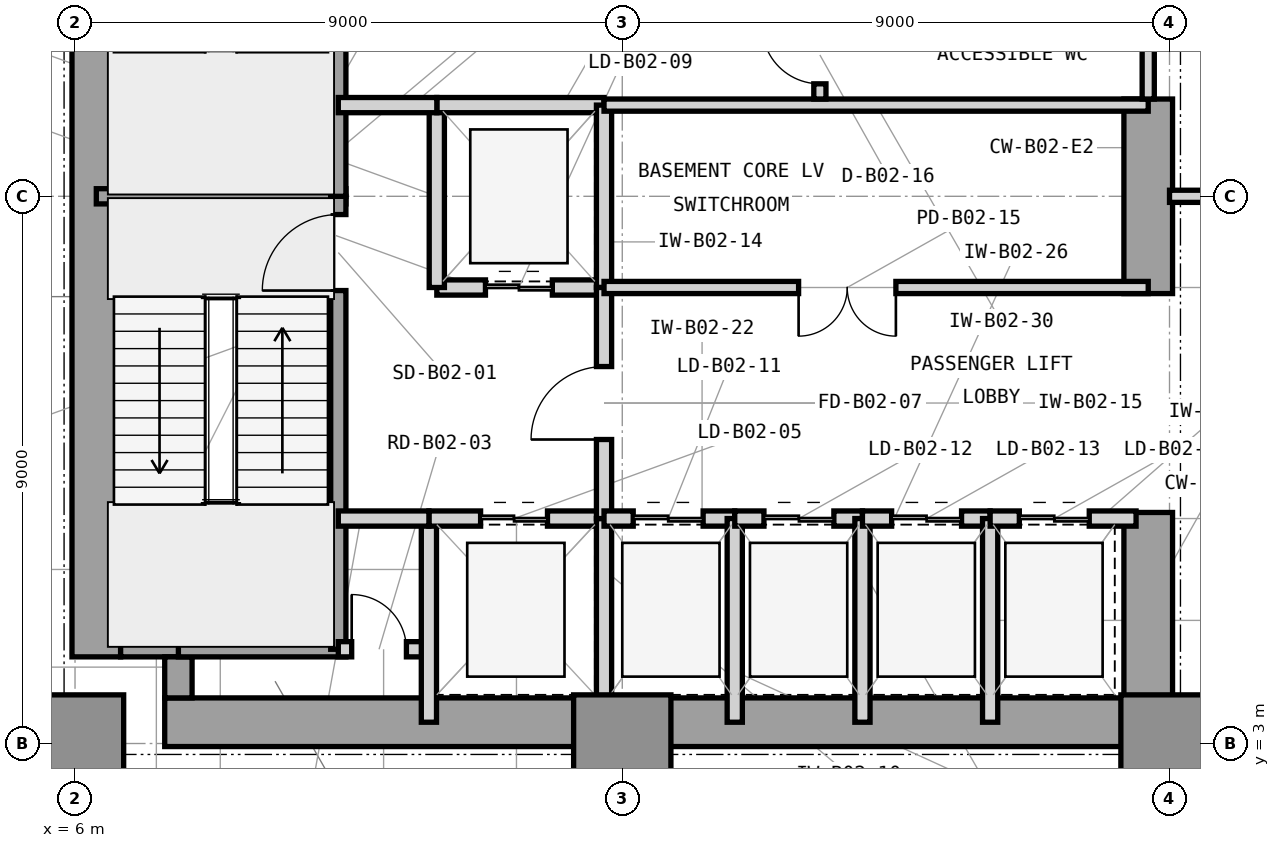
"""IFC4 building model, lengths in metres.
Left out: names, types, materials, properties, quantities, classifications, styles, units other than length and angle.
Written with IfcOpenShell. Run it as: python <this file> out.ifc"""

import sys

from ifc_helpers import new_model, si_unit, direction, frame, frame_2d, origin, origin_2d, place, context, subcontext, project, spatial, rectangle, extrude, element, fill, save


model = new_model("IFC4")
c1 = context("Model", 3, precision=1e-05, world=origin(), true_north=direction((0.0, 1.0)))
c2 = subcontext(c1, "Body", "Model", "MODEL_VIEW")
j1 = project(units=[si_unit("LENGTHUNIT", "METRE"), si_unit("PLANEANGLEUNIT", "RADIAN")], contexts=[c1])
p1 = place(None, origin())
s1 = spatial("IfcSite", under=j1, at=p1, CompositionType="ELEMENT")
p2 = place(p1, origin())
s2 = spatial("IfcBuilding", under=s1, at=p2, CompositionType="ELEMENT")
p3 = place(p2, frame((0.0, 0.0, -9.0)))
s3 = spatial("IfcBuildingStorey", under=s2, at=p3, CompositionType="ELEMENT", Elevation=-9.0)
p4 = place(p3, frame((7.475, 3.35, 0.0), z_axis=(0.0, 0.0, 1.0), x_axis=(1.0, 0.0, 0.0)))
e1 = element("IfcWall", 1, at=p4, inside=s3, PredefinedType="SHEAR", context=c2, shape_type="SweptSolid", body=[
    extrude(rectangle(XDim=16.575, YDim=0.8, at=frame_2d((8.288, 0.0))), origin(), (0.0, 0.0, 1.0), 4.5),
])
p5 = place(p3, frame((6.35, 4.425, 0.0), z_axis=(0.0, 0.0, 1.0), x_axis=(0.0, 1.0, 0.0)))
e2 = element("IfcWall", 2, at=p5, inside=s3, PredefinedType="SHEAR", context=c2, shape_type="SweptSolid", body=[
    extrude(rectangle(XDim=15.15, YDim=0.8, at=frame_2d((7.575, 0.0))), origin(), (0.0, 0.0, 1.0), 4.5),
])
p6 = place(p3, frame((23.65, 3.75, 0.0), z_axis=(0.0, 0.0, 1.0), x_axis=(0.0, 1.0, 0.0)))
e3 = element("IfcWall", 3, at=p6, inside=s3, PredefinedType="SHEAR", context=c2, shape_type="SweptSolid", body=[
    extrude(rectangle(XDim=3.05, YDim=0.8, at=frame_2d((1.525, 0.0))), origin(), (0.0, 0.0, 1.0), 4.5),
])
p7 = place(p3, frame((23.65, 10.4, 0.0), z_axis=(0.0, 0.0, 1.0), x_axis=(0.0, 1.0, 0.0)))
e4 = element("IfcWall", 4, at=p7, inside=s3, PredefinedType="SHEAR", context=c2, shape_type="SweptSolid", body=[
    extrude(rectangle(XDim=3.2, YDim=0.8, at=frame_2d((1.6, 0.0))), origin(), (0.0, 0.0, 1.0), 4.5),
])
p8 = place(p3, frame((6.75, 4.65, 0.0), z_axis=(0.0, 0.0, 1.0), x_axis=(1.0, 0.0, 0.0)))
e5 = element("IfcWall", 5, at=p8, inside=s3, PredefinedType="SHEAR", context=c2, shape_type="SweptSolid", body=[
    extrude(rectangle(XDim=1.175, YDim=0.45, at=frame_2d((0.587, 0.0))), origin(), (0.0, 0.0, 1.0), 4.5),
])
p9 = place(p3, frame((7.7, 3.75, 0.0), z_axis=(0.0, 0.0, 1.0), x_axis=(0.0, 1.0, 0.0)))
e6 = element("IfcWall", 6, at=p9, inside=s3, PredefinedType="SHEAR", context=c2, shape_type="SweptSolid", body=[
    extrude(rectangle(XDim=0.675, YDim=0.45, at=frame_2d((0.337, 0.0))), origin(), (0.0, 0.0, 1.0), 4.5),
])
for number, where, z_axis, x_axis in (
    (7, (6.0, 3.0, 0.0), (0.0, 0.0, 1.0), (1.0, 0.0, 0.0)),
    (8, (15.0, 3.0, 0.0), (0.0, 0.0, 1.0), (1.0, 0.0, 0.0)),
    (9, (24.0, 3.0, 0.0), (0.0, 0.0, 1.0), (1.0, 0.0, 0.0)),
):
    element("IfcColumn", number, at=place(p3, frame(where, z_axis=z_axis, x_axis=x_axis)), inside=s3, PredefinedType="COLUMN", context=c2, shape_type="SweptSolid", body=[
        extrude(rectangle(XDim=1.6, YDim=1.6, at=origin_2d()), origin(), (0.0, 0.0, 1.0), 4.5),
    ])
p10 = place(p3, frame((6.35, 12.0, 0.0), z_axis=(0.0, 0.0, 1.0), x_axis=(1.0, 0.0, 0.0)))
e10 = element("IfcWall", 10, at=p10, inside=s3, PredefinedType="SHEAR", context=c2, shape_type="SweptSolid", body=[
    extrude(rectangle(XDim=4.105, YDim=0.25, at=frame_2d((2.052, 0.0))), origin(), (0.0, 0.0, 1.0), 4.5),
])
p11 = place(p3, frame((7.7, 4.55, 0.0), z_axis=(0.0, 0.0, 1.0), x_axis=(1.0, 0.0, 0.0)))
e11 = element("IfcWall", 11, at=p11, inside=s3, PredefinedType="SHEAR", context=c2, shape_type="SweptSolid", body=[
    extrude(rectangle(XDim=2.755, YDim=0.25, at=frame_2d((1.377, 0.0))), origin(), (0.0, 0.0, 1.0), 4.5),
])
p12 = place(p3, frame((10.33, 4.55, 0.0), z_axis=(0.0, 0.0, 1.0), x_axis=(0.0, 1.0, 0.0)))
e12 = element("IfcWall", 12, at=p12, inside=s3, PredefinedType="SHEAR", context=c2, shape_type="SweptSolid", body=[
    extrude(rectangle(XDim=7.45, YDim=0.25, at=frame_2d((3.725, 0.0))), origin(), (0.0, 0.0, 1.0), 4.5),
])
p13 = place(p12, frame((5.9, 0.0, 0.0)))
e13 = element("IfcOpeningElement", 13, at=p13, cuts=e12, PredefinedType="OPENING", context=c2, shape_type="SweptSolid", body=[
    extrude(rectangle(XDim=1.25, YDim=2.2, at=frame_2d((0.625, 1.1))), frame((0.0, 0.135, 0.0), z_axis=(0.0, -1.0, 0.0), x_axis=(1.0, 0.0, 0.0)), (0.0, 0.0, 1.0), 0.27),
])
p14 = place(p3, frame((10.33, 12.0, 0.0), z_axis=(0.0, 0.0, 1.0), x_axis=(0.0, 1.0, 0.0)))
e14 = element("IfcWall", 14, at=p14, inside=s3, PredefinedType="SHEAR", context=c2, shape_type="SweptSolid", body=[
    extrude(rectangle(XDim=7.45, YDim=0.25, at=frame_2d((3.725, 0.0))), origin(), (0.0, 0.0, 1.0), 4.5),
])
p15 = place(p14, frame((5.85, 0.0, 0.0)))
e15 = element("IfcOpeningElement", 15, at=p15, cuts=e14, PredefinedType="OPENING", context=c2, shape_type="SweptSolid", body=[
    extrude(rectangle(XDim=1.25, YDim=2.2, at=frame_2d((0.625, 1.1))), frame((0.0, 0.135, 0.0), z_axis=(0.0, -1.0, 0.0), x_axis=(1.0, 0.0, 0.0)), (0.0, 0.0, 1.0), 0.27),
])
p16 = place(p3, frame((10.33, 4.55, 0.0), z_axis=(0.0, 0.0, 1.0), x_axis=(1.0, 0.0, 0.0)))
e16 = element("IfcWall", 16, at=p16, inside=s3, PredefinedType="PARTITIONING", context=c2, shape_type="SweptSolid", body=[
    extrude(rectangle(XDim=1.49, YDim=0.25, at=frame_2d((0.745, 0.0))), origin(), (0.0, 0.0, 1.0), 4.14),
])
p17 = place(p16, frame((0.22, 0.0, 0.0)))
e17 = element("IfcOpeningElement", 17, at=p17, cuts=e16, PredefinedType="OPENING", context=c2, shape_type="SweptSolid", body=[
    extrude(rectangle(XDim=0.9, YDim=2.1, at=frame_2d((0.45, 1.05))), frame((0.0, 0.135, 0.0), z_axis=(0.0, -1.0, 0.0), x_axis=(1.0, 0.0, 0.0)), (0.0, 0.0, 1.0), 0.27),
])
p18 = place(p3, frame((11.82, 3.35, 0.0), z_axis=(0.0, 0.0, 1.0), x_axis=(0.0, 1.0, 0.0)))
e18 = element("IfcWall", 18, at=p18, inside=s3, PredefinedType="PARTITIONING", context=c2, shape_type="SweptSolid", body=[
    extrude(rectangle(XDim=3.35, YDim=0.25, at=frame_2d((1.675, 0.0))), origin(), (0.0, 0.0, 1.0), 4.14),
])
p19 = place(p3, frame((11.82, 6.7, 0.0), z_axis=(0.0, 0.0, 1.0), x_axis=(1.0, 0.0, 0.0)))
e19 = element("IfcWall", 19, at=p19, inside=s3, PredefinedType="PARTITIONING", context=c2, shape_type="SweptSolid", body=[
    extrude(rectangle(XDim=2.88, YDim=0.25, at=frame_2d((1.44, 0.0))), origin(), (0.0, 0.0, 1.0), 3.523),
])
p20 = place(p19, frame((0.85, 0.0, 0.0)))
e20 = element("IfcOpeningElement", 20, at=p20, cuts=e19, PredefinedType="OPENING", context=c2, shape_type="SweptSolid", body=[
    extrude(rectangle(XDim=1.1, YDim=2.25, at=frame_2d((0.55, 1.125))), frame((0.0, 0.135, 0.0), z_axis=(0.0, -1.0, 0.0), x_axis=(1.0, 0.0, 0.0)), (0.0, 0.0, 1.0), 0.27),
])
p21 = place(p3, frame((14.7, 3.35, 0.0), z_axis=(0.0, 0.0, 1.0), x_axis=(0.0, 1.0, 0.0)))
e21 = element("IfcWall", 21, at=p21, inside=s3, PredefinedType="PARTITIONING", context=c2, shape_type="SweptSolid", body=[
    extrude(rectangle(XDim=3.35, YDim=0.25, at=frame_2d((1.675, 0.0))), origin(), (0.0, 0.0, 1.0), 4.14),
])
p22 = place(p3, frame((11.95, 10.5, 0.0), z_axis=(0.0, 0.0, 1.0), x_axis=(1.0, 0.0, 0.0)))
e22 = element("IfcWall", 22, at=p22, inside=s3, PredefinedType="PARTITIONING", context=c2, shape_type="SweptSolid", body=[
    extrude(rectangle(XDim=2.75, YDim=0.25, at=frame_2d((1.375, 0.0))), origin(), (0.0, 0.0, 1.0), 3.523),
])
p23 = place(p22, frame((0.8, 0.0, 0.0)))
e23 = element("IfcOpeningElement", 23, at=p23, cuts=e22, PredefinedType="OPENING", context=c2, shape_type="SweptSolid", body=[
    extrude(rectangle(XDim=1.1, YDim=2.25, at=frame_2d((0.55, 1.125))), frame((0.0, 0.135, 0.0), z_axis=(0.0, -1.0, 0.0), x_axis=(1.0, 0.0, 0.0)), (0.0, 0.0, 1.0), 0.27),
])
p24 = place(p3, frame((11.95, 10.5, 0.0), z_axis=(0.0, 0.0, 1.0), x_axis=(0.0, 1.0, 0.0)))
e24 = element("IfcWall", 24, at=p24, inside=s3, PredefinedType="PARTITIONING", context=c2, shape_type="SweptSolid", body=[
    extrude(rectangle(XDim=3.0, YDim=0.25, at=frame_2d((1.5, 0.0))), origin(), (0.0, 0.0, 1.0), 4.14),
])
p25 = place(p3, frame((11.95, 13.5, 0.0), z_axis=(0.0, 0.0, 1.0), x_axis=(1.0, 0.0, 0.0)))
e25 = element("IfcWall", 25, at=p25, inside=s3, PredefinedType="PARTITIONING", context=c2, shape_type="SweptSolid", body=[
    extrude(rectangle(XDim=2.75, YDim=0.25, at=frame_2d((1.375, 0.0))), origin(), (0.0, 0.0, 1.0), 3.523),
])
p26 = place(p3, frame((14.7, 10.5, 0.0), z_axis=(0.0, 0.0, 1.0), x_axis=(0.0, 1.0, 0.0)))
e26 = element("IfcWall", 26, at=p26, inside=s3, PredefinedType="PARTITIONING", context=c2, shape_type="SweptSolid", body=[
    extrude(rectangle(XDim=3.0, YDim=0.25, at=frame_2d((1.5, 0.0))), origin(), (0.0, 0.0, 1.0), 4.14),
])
p27 = place(p3, frame((14.7, 6.7, 0.0), z_axis=(0.0, 0.0, 1.0), x_axis=(0.0, 1.0, 0.0)))
e27 = element("IfcWall", 27, at=p27, inside=s3, PredefinedType="PARTITIONING", context=c2, shape_type="SweptSolid", body=[
    extrude(rectangle(XDim=3.8, YDim=0.25, at=frame_2d((1.9, 0.0))), origin(), (0.0, 0.0, 1.0), 4.14),
])
p28 = place(p27, frame((1.3, 0.0, 0.0)))
e28 = element("IfcOpeningElement", 28, at=p28, cuts=e27, PredefinedType="OPENING", context=c2, shape_type="SweptSolid", body=[
    extrude(rectangle(XDim=1.2, YDim=2.2, at=frame_2d((0.6, 1.1))), frame((0.0, 0.135, 0.0), z_axis=(0.0, -1.0, 0.0), x_axis=(1.0, 0.0, 0.0)), (0.0, 0.0, 1.0), 0.27),
])
p29 = place(p3, frame((10.33, 13.5, 0.0), z_axis=(0.0, 0.0, 1.0), x_axis=(1.0, 0.0, 0.0)))
e29 = element("IfcWall", 29, at=p29, inside=s3, PredefinedType="PARTITIONING", context=c2, shape_type="SweptSolid", body=[
    extrude(rectangle(XDim=1.62, YDim=0.25, at=frame_2d((0.81, 0.0))), origin(), (0.0, 0.0, 1.0), 3.523),
])
p30 = place(p3, frame((10.33, 6.7, 0.0), z_axis=(0.0, 0.0, 1.0), x_axis=(1.0, 0.0, 0.0)))
e30 = element("IfcWall", 30, at=p30, inside=s3, PredefinedType="PARTITIONING", context=c2, shape_type="SweptSolid", body=[
    extrude(rectangle(XDim=1.49, YDim=0.25, at=frame_2d((0.745, 0.0))), origin(), (0.0, 0.0, 1.0), 3.523),
])
p31 = place(p3, frame((14.7, 6.7, 0.0), z_axis=(0.0, 0.0, 1.0), x_axis=(1.0, 0.0, 0.0)))
e31 = element("IfcWall", 31, at=p31, inside=s3, PredefinedType="PARTITIONING", context=c2, shape_type="SweptSolid", body=[
    extrude(rectangle(XDim=2.15, YDim=0.25, at=frame_2d((1.075, 0.0))), origin(), (0.0, 0.0, 1.0), 3.523),
])
p32 = place(p31, frame((0.48, 0.0, 0.0)))
e32 = element("IfcOpeningElement", 32, at=p32, cuts=e31, PredefinedType="OPENING", context=c2, shape_type="SweptSolid", body=[
    extrude(rectangle(XDim=1.15, YDim=2.25, at=frame_2d((0.575, 1.125))), frame((0.0, 0.135, 0.0), z_axis=(0.0, -1.0, 0.0), x_axis=(1.0, 0.0, 0.0)), (0.0, 0.0, 1.0), 0.27),
])
p33 = place(p3, frame((16.85, 3.35, 0.0), z_axis=(0.0, 0.0, 1.0), x_axis=(0.0, 1.0, 0.0)))
e33 = element("IfcWall", 33, at=p33, inside=s3, PredefinedType="PARTITIONING", context=c2, shape_type="SweptSolid", body=[
    extrude(rectangle(XDim=3.35, YDim=0.25, at=frame_2d((1.675, 0.0))), origin(), (0.0, 0.0, 1.0), 4.14),
])
p34 = place(p3, frame((16.85, 6.7, 0.0), z_axis=(0.0, 0.0, 1.0), x_axis=(1.0, 0.0, 0.0)))
e34 = element("IfcWall", 34, at=p34, inside=s3, PredefinedType="PARTITIONING", context=c2, shape_type="SweptSolid", body=[
    extrude(rectangle(XDim=2.1, YDim=0.25, at=frame_2d((1.05, 0.0))), origin(), (0.0, 0.0, 1.0), 3.523),
])
p35 = place(p34, frame((0.48, 0.0, 0.0)))
e35 = element("IfcOpeningElement", 35, at=p35, cuts=e34, PredefinedType="OPENING", context=c2, shape_type="SweptSolid", body=[
    extrude(rectangle(XDim=1.15, YDim=2.25, at=frame_2d((0.575, 1.125))), frame((0.0, 0.135, 0.0), z_axis=(0.0, -1.0, 0.0), x_axis=(1.0, 0.0, 0.0)), (0.0, 0.0, 1.0), 0.27),
])
p36 = place(p3, frame((18.95, 3.35, 0.0), z_axis=(0.0, 0.0, 1.0), x_axis=(0.0, 1.0, 0.0)))
e36 = element("IfcWall", 36, at=p36, inside=s3, PredefinedType="PARTITIONING", context=c2, shape_type="SweptSolid", body=[
    extrude(rectangle(XDim=3.35, YDim=0.25, at=frame_2d((1.675, 0.0))), origin(), (0.0, 0.0, 1.0), 4.14),
])
p37 = place(p3, frame((18.95, 6.7, 0.0), z_axis=(0.0, 0.0, 1.0), x_axis=(1.0, 0.0, 0.0)))
e37 = element("IfcWall", 37, at=p37, inside=s3, PredefinedType="PARTITIONING", context=c2, shape_type="SweptSolid", body=[
    extrude(rectangle(XDim=2.1, YDim=0.25, at=frame_2d((1.05, 0.0))), origin(), (0.0, 0.0, 1.0), 3.523),
])
p38 = place(p37, frame((0.48, 0.0, 0.0)))
e38 = element("IfcOpeningElement", 38, at=p38, cuts=e37, PredefinedType="OPENING", context=c2, shape_type="SweptSolid", body=[
    extrude(rectangle(XDim=1.15, YDim=2.25, at=frame_2d((0.575, 1.125))), frame((0.0, 0.135, 0.0), z_axis=(0.0, -1.0, 0.0), x_axis=(1.0, 0.0, 0.0)), (0.0, 0.0, 1.0), 0.27),
])
p39 = place(p3, frame((21.05, 3.35, 0.0), z_axis=(0.0, 0.0, 1.0), x_axis=(0.0, 1.0, 0.0)))
e39 = element("IfcWall", 39, at=p39, inside=s3, PredefinedType="PARTITIONING", context=c2, shape_type="SweptSolid", body=[
    extrude(rectangle(XDim=3.35, YDim=0.25, at=frame_2d((1.675, 0.0))), origin(), (0.0, 0.0, 1.0), 4.14),
])
p40 = place(p3, frame((21.05, 6.7, 0.0), z_axis=(0.0, 0.0, 1.0), x_axis=(1.0, 0.0, 0.0)))
e40 = element("IfcWall", 40, at=p40, inside=s3, PredefinedType="PARTITIONING", context=c2, shape_type="SweptSolid", body=[
    extrude(rectangle(XDim=2.4, YDim=0.25, at=frame_2d((1.2, 0.0))), origin(), (0.0, 0.0, 1.0), 3.523),
])
p41 = place(p40, frame((0.48, 0.0, 0.0)))
e41 = element("IfcOpeningElement", 41, at=p41, cuts=e40, PredefinedType="OPENING", context=c2, shape_type="SweptSolid", body=[
    extrude(rectangle(XDim=1.15, YDim=2.25, at=frame_2d((0.575, 1.125))), frame((0.0, 0.135, 0.0), z_axis=(0.0, -1.0, 0.0), x_axis=(1.0, 0.0, 0.0)), (0.0, 0.0, 1.0), 0.27),
])
p42 = place(p3, frame((14.7, 10.5, 0.0), z_axis=(0.0, 0.0, 1.0), x_axis=(1.0, 0.0, 0.0)))
e42 = element("IfcWall", 42, at=p42, inside=s3, PredefinedType="PARTITIONING", context=c2, shape_type="SweptSolid", body=[
    extrude(rectangle(XDim=8.95, YDim=0.2, at=frame_2d((4.475, 0.0))), origin(), (0.0, 0.0, 1.0), 3.523),
])
p43 = place(p42, frame((3.2, 0.0, 0.0)))
e43 = element("IfcOpeningElement", 43, at=p43, cuts=e42, PredefinedType="OPENING", context=c2, shape_type="SweptSolid", body=[
    extrude(rectangle(XDim=1.6, YDim=2.3, at=frame_2d((0.8, 1.15))), frame((0.0, 0.11, 0.0), z_axis=(0.0, -1.0, 0.0), x_axis=(1.0, 0.0, 0.0)), (0.0, 0.0, 1.0), 0.22),
])
p44 = place(p3, frame((14.7, 13.5, 0.0), z_axis=(0.0, 0.0, 1.0), x_axis=(1.0, 0.0, 0.0)))
e44 = element("IfcWall", 44, at=p44, inside=s3, PredefinedType="PARTITIONING", context=c2, shape_type="SweptSolid", body=[
    extrude(rectangle(XDim=8.95, YDim=0.2, at=frame_2d((4.475, 0.0))), origin(), (0.0, 0.0, 1.0), 3.523),
])
p45 = place(p3, frame((18.25, 13.6, 0.0), z_axis=(0.0, 0.0, 1.0), x_axis=(0.0, 1.0, 0.0)))
e45 = element("IfcWall", 45, at=p45, inside=s3, PredefinedType="PARTITIONING", context=c2, shape_type="SweptSolid", body=[
    extrude(rectangle(XDim=3.0, YDim=0.2, at=frame_2d((1.5, 0.0))), origin(), (0.0, 0.0, 1.0), 4.14),
])
p46 = place(p45, frame((0.25, 0.0, 0.0)))
e46 = element("IfcOpeningElement", 46, at=p46, cuts=e45, PredefinedType="OPENING", context=c2, shape_type="SweptSolid", body=[
    extrude(rectangle(XDim=0.95, YDim=2.1, at=frame_2d((0.475, 1.05))), frame((0.0, 0.11, 0.0), z_axis=(0.0, -1.0, 0.0), x_axis=(1.0, 0.0, 0.0)), (0.0, 0.0, 1.0), 0.22),
])
p47 = place(p45, frame((1.8, 0.0, 0.0)))
e47 = element("IfcOpeningElement", 47, at=p47, cuts=e45, PredefinedType="OPENING", context=c2, shape_type="SweptSolid", body=[
    extrude(rectangle(XDim=0.95, YDim=2.1, at=frame_2d((0.475, 1.05))), frame((0.0, 0.11, 0.0), z_axis=(0.0, -1.0, 0.0), x_axis=(1.0, 0.0, 0.0)), (0.0, 0.0, 1.0), 0.22),
])
p48 = place(p3, frame((23.65, 13.6, 0.0), z_axis=(0.0, 0.0, 1.0), x_axis=(0.0, 1.0, 0.0)))
e48 = element("IfcWall", 48, at=p48, inside=s3, PredefinedType="PARTITIONING", context=c2, shape_type="SweptSolid", body=[
    extrude(rectangle(XDim=3.0, YDim=0.2, at=frame_2d((1.5, 0.0))), origin(), (0.0, 0.0, 1.0), 4.14),
])
p49 = place(p3, frame((24.0, 12.0, 0.0), z_axis=(0.0, 0.0, 1.0), x_axis=(1.0, 0.0, 0.0)))
e49 = element("IfcWall", 49, at=p49, inside=s3, PredefinedType="PARTITIONING", context=c2, shape_type="SweptSolid", body=[
    extrude(rectangle(XDim=21.0, YDim=0.2, at=frame_2d((10.5, 0.0))), origin(), (0.0, 0.0, 1.0), 3.2),
])
p50 = place(p49, frame((12.0, 0.0, 0.0)))
e50 = element("IfcOpeningElement", 50, at=p50, cuts=e49, PredefinedType="OPENING", context=c2, shape_type="SweptSolid", body=[
    extrude(rectangle(XDim=1.6, YDim=2.3, at=frame_2d((0.8, 1.15))), frame((0.0, 0.11, 0.0), z_axis=(0.0, -1.0, 0.0), x_axis=(1.0, 0.0, 0.0)), (0.0, 0.0, 1.0), 0.22),
])
p51 = place(p13, origin())
e51 = element("IfcDoor", 51, at=p51, inside=s3, OperationType="SINGLE_SWING_LEFT", PredefinedType="DOOR", context=c2, shape_type="SweptSolid", body=[
    extrude(rectangle(XDim=1.25, YDim=2.2, at=frame_2d((0.625, 1.1))), frame((0.0, 0.025, 0.0), z_axis=(0.0, -1.0, 0.0), x_axis=(1.0, 0.0, 0.0)), (0.0, 0.0, 1.0), 0.05),
])
fill(e13, e51)
p52 = place(p17, origin())
e52 = element("IfcDoor", 52, at=p52, inside=s3, OperationType="SINGLE_SWING_LEFT", PredefinedType="TRAPDOOR", context=c2, shape_type="SweptSolid", body=[
    extrude(rectangle(XDim=0.9, YDim=2.1, at=frame_2d((0.45, 1.05))), frame((0.0, 0.025, 0.0), z_axis=(0.0, -1.0, 0.0), x_axis=(1.0, 0.0, 0.0)), (0.0, 0.0, 1.0), 0.05),
])
fill(e17, e52)
p53 = place(p20, origin())
e53 = element("IfcDoor", 53, at=p53, inside=s3, OperationType="DOUBLE_DOOR_SLIDING", PredefinedType="DOOR", context=c2, shape_type="SweptSolid", body=[
    extrude(rectangle(XDim=1.1, YDim=2.25, at=frame_2d((0.55, 1.125))), frame((0.0, 0.025, 0.0), z_axis=(0.0, -1.0, 0.0), x_axis=(1.0, 0.0, 0.0)), (0.0, 0.0, 1.0), 0.05),
])
fill(e20, e53)
p54 = place(p23, origin())
e54 = element("IfcDoor", 54, at=p54, inside=s3, OperationType="DOUBLE_DOOR_SLIDING", PredefinedType="DOOR", context=c2, shape_type="SweptSolid", body=[
    extrude(rectangle(XDim=1.1, YDim=2.25, at=frame_2d((0.55, 1.125))), frame((0.0, 0.025, 0.0), z_axis=(0.0, -1.0, 0.0), x_axis=(1.0, 0.0, 0.0)), (0.0, 0.0, 1.0), 0.05),
])
fill(e23, e54)
p55 = place(p28, origin())
e55 = element("IfcDoor", 55, at=p55, inside=s3, OperationType="SINGLE_SWING_LEFT", PredefinedType="DOOR", context=c2, shape_type="SweptSolid", body=[
    extrude(rectangle(XDim=1.2, YDim=2.2, at=frame_2d((0.6, 1.1))), frame((0.0, 0.025, 0.0), z_axis=(0.0, -1.0, 0.0), x_axis=(1.0, 0.0, 0.0)), (0.0, 0.0, 1.0), 0.05),
])
fill(e28, e55)
p56 = place(p32, origin())
e56 = element("IfcDoor", 56, at=p56, inside=s3, OperationType="DOUBLE_DOOR_SLIDING", PredefinedType="DOOR", context=c2, shape_type="SweptSolid", body=[
    extrude(rectangle(XDim=1.15, YDim=2.25, at=frame_2d((0.575, 1.125))), frame((0.0, 0.025, 0.0), z_axis=(0.0, -1.0, 0.0), x_axis=(1.0, 0.0, 0.0)), (0.0, 0.0, 1.0), 0.05),
])
fill(e32, e56)
p57 = place(p35, origin())
e57 = element("IfcDoor", 57, at=p57, inside=s3, OperationType="DOUBLE_DOOR_SLIDING", PredefinedType="DOOR", context=c2, shape_type="SweptSolid", body=[
    extrude(rectangle(XDim=1.15, YDim=2.25, at=frame_2d((0.575, 1.125))), frame((0.0, 0.025, 0.0), z_axis=(0.0, -1.0, 0.0), x_axis=(1.0, 0.0, 0.0)), (0.0, 0.0, 1.0), 0.05),
])
fill(e35, e57)
p58 = place(p38, origin())
e58 = element("IfcDoor", 58, at=p58, inside=s3, OperationType="DOUBLE_DOOR_SLIDING", PredefinedType="DOOR", context=c2, shape_type="SweptSolid", body=[
    extrude(rectangle(XDim=1.15, YDim=2.25, at=frame_2d((0.575, 1.125))), frame((0.0, 0.025, 0.0), z_axis=(0.0, -1.0, 0.0), x_axis=(1.0, 0.0, 0.0)), (0.0, 0.0, 1.0), 0.05),
])
fill(e38, e58)
p59 = place(p41, origin())
e59 = element("IfcDoor", 59, at=p59, inside=s3, OperationType="DOUBLE_DOOR_SLIDING", PredefinedType="DOOR", context=c2, shape_type="SweptSolid", body=[
    extrude(rectangle(XDim=1.15, YDim=2.25, at=frame_2d((0.575, 1.125))), frame((0.0, 0.025, 0.0), z_axis=(0.0, -1.0, 0.0), x_axis=(1.0, 0.0, 0.0)), (0.0, 0.0, 1.0), 0.05),
])
fill(e41, e59)
p60 = place(p43, frame((1.6, 0.0, 0.0), z_axis=(0.0, 0.0, 1.0), x_axis=(-1.0, 0.0, 0.0)))
e60 = element("IfcDoor", 60, at=p60, inside=s3, OperationType="DOUBLE_DOOR_SINGLE_SWING", PredefinedType="DOOR", context=c2, shape_type="SweptSolid", body=[
    extrude(rectangle(XDim=1.6, YDim=2.3, at=frame_2d((0.8, 1.15))), frame((0.0, 0.025, 0.0), z_axis=(0.0, -1.0, 0.0), x_axis=(1.0, 0.0, 0.0)), (0.0, 0.0, 1.0), 0.05),
])
fill(e43, e60)
p61 = place(p46, origin())
e61 = element("IfcDoor", 61, at=p61, inside=s3, OperationType="SINGLE_SWING_RIGHT", PredefinedType="DOOR", context=c2, shape_type="SweptSolid", body=[
    extrude(rectangle(XDim=0.95, YDim=2.1, at=frame_2d((0.475, 1.05))), frame((0.0, 0.025, 0.0), z_axis=(0.0, -1.0, 0.0), x_axis=(1.0, 0.0, 0.0)), (0.0, 0.0, 1.0), 0.05),
])
fill(e46, e61)
save(model, sys.argv[1])
